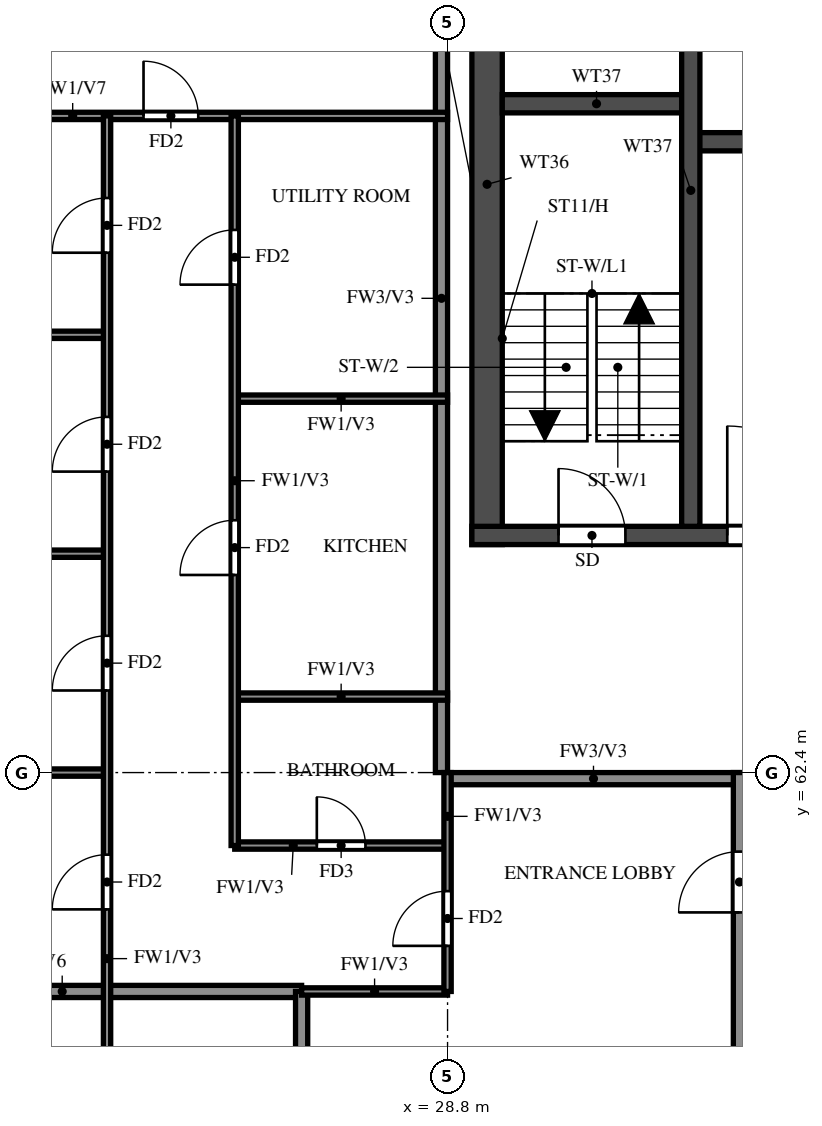
"""IFC4 building model, lengths in metres.
Left out: names, types, materials, properties, quantities, classifications, styles, units other than length and angle.
Written with IfcOpenShell. Run it as: python <this file> out.ifc"""

import sys

from ifc_helpers import new_model, si_unit, direction, frame, frame_2d, origin, place, context, subcontext, project, spatial, rectangle, extrude, element, fill, save


model = new_model("IFC4")
c1 = context("Model", 3, precision=1e-05, world=origin(), true_north=direction((0.0, 1.0)))
c2 = subcontext(c1, "Body", "Model", "MODEL_VIEW")
j1 = project(units=[si_unit("LENGTHUNIT", "METRE"), si_unit("PLANEANGLEUNIT", "RADIAN")], contexts=[c1])
p1 = place(None, origin())
s1 = spatial("IfcSite", under=j1, at=p1, CompositionType="ELEMENT")
p2 = place(p1, origin())
s2 = spatial("IfcBuilding", under=s1, at=p2, CompositionType="ELEMENT")
p3 = place(p2, frame((0.0, 0.0, 239.5)))
s3 = spatial("IfcBuildingStorey", under=s2, at=p3, CompositionType="ELEMENT", Elevation=239.5)
p4 = place(p3, frame((29.45, 66.15, 0.0), z_axis=(0.0, 0.0, 1.0), x_axis=(0.0, 1.0, 0.0)))
e1 = element("IfcWall", 1, at=p4, inside=s3, PredefinedType="SHEAR", context=c2, shape_type="SweptSolid", body=[
    extrude(rectangle(XDim=11.85, YDim=0.5, at=frame_2d((5.925, 0.0))), origin(), (0.0, 0.0, 1.0), 3.22),
])
p5 = place(p3, frame((29.2, 66.3, 0.0), z_axis=(0.0, 0.0, 1.0), x_axis=(1.0, 0.0, 0.0)))
e2 = element("IfcWall", 2, at=p5, inside=s3, PredefinedType="SHEAR", context=c2, shape_type="SweptSolid", body=[
    extrude(rectangle(XDim=42.4, YDim=0.3, at=frame_2d((21.2, 0.0))), origin(), (0.0, 0.0, 1.0), 3.22),
])
p6 = place(p5, frame((1.425, 0.0, 0.0)))
e3 = element("IfcOpeningElement", 3, at=p6, cuts=e2, PredefinedType="OPENING", context=c2, shape_type="SweptSolid", body=[
    extrude(rectangle(XDim=1.1, YDim=2.1, at=frame_2d((0.55, 1.05))), frame((0.0, 0.16, 0.0), z_axis=(0.0, -1.0, 0.0), x_axis=(1.0, 0.0, 0.0)), (0.0, 0.0, 1.0), 0.32),
])
p7 = place(p5, frame((4.2, 0.0, 0.0)))
e4 = element("IfcOpeningElement", 4, at=p7, cuts=e2, PredefinedType="OPENING", context=c2, shape_type="SweptSolid", body=[
    extrude(rectangle(XDim=1.8, YDim=2.1, at=frame_2d((0.9, 1.05))), frame((0.0, 0.16, 0.0), z_axis=(0.0, -1.0, 0.0), x_axis=(1.0, 0.0, 0.0)), (0.0, 0.0, 1.0), 0.32),
])
p8 = place(p3, frame((32.8, 72.775, 0.0), z_axis=(0.0, 0.0, 1.0), x_axis=(1.0, 0.0, 0.0)))
e5 = element("IfcWall", 5, at=p8, inside=s3, PredefinedType="SHEAR", context=c2, shape_type="SweptSolid", body=[
    extrude(rectangle(XDim=35.2, YDim=0.3, at=frame_2d((17.6, 0.0))), origin(), (0.0, 0.0, 1.0), 3.22),
])
p9 = place(p8, frame((19.8, 0.0, 0.0)))
e6 = element("IfcOpeningElement", 6, at=p9, cuts=e5, PredefinedType="OPENING", context=c2, shape_type="SweptSolid", body=[
    extrude(rectangle(XDim=1.1, YDim=2.1, at=frame_2d((0.55, 1.05))), frame((0.0, 0.16, 0.0), z_axis=(0.0, -1.0, 0.0), x_axis=(1.0, 0.0, 0.0)), (0.0, 0.0, 1.0), 0.32),
])
p10 = place(p8, frame((27.725, 0.0, 0.0)))
e7 = element("IfcOpeningElement", 7, at=p10, cuts=e5, PredefinedType="OPENING", context=c2, shape_type="SweptSolid", body=[
    extrude(rectangle(XDim=1.1, YDim=2.1, at=frame_2d((0.55, 1.05))), frame((0.0, 0.16, 0.0), z_axis=(0.0, -1.0, 0.0), x_axis=(1.0, 0.0, 0.0)), (0.0, 0.0, 1.0), 0.32),
])
p11 = place(p8, frame((30.325, 0.0, 0.0)))
e8 = element("IfcOpeningElement", 8, at=p11, cuts=e5, PredefinedType="OPENING", context=c2, shape_type="SweptSolid", body=[
    extrude(rectangle(XDim=1.1, YDim=2.1, at=frame_2d((0.55, 1.05))), frame((0.0, 0.16, 0.0), z_axis=(0.0, -1.0, 0.0), x_axis=(1.0, 0.0, 0.0)), (0.0, 0.0, 1.0), 0.32),
])
p12 = place(p8, frame((3.825, 0.0, 0.0)))
e9 = element("IfcOpeningElement", 9, at=p12, cuts=e5, PredefinedType="OPENING", context=c2, shape_type="SweptSolid", body=[
    extrude(rectangle(XDim=1.1, YDim=2.1, at=frame_2d((0.55, 1.05))), frame((0.0, 0.16, 0.0), z_axis=(0.0, -1.0, 0.0), x_axis=(1.0, 0.0, 0.0)), (0.0, 0.0, 1.0), 0.32),
])
p13 = place(p8, frame((6.575, 0.0, 0.0)))
e10 = element("IfcOpeningElement", 10, at=p13, cuts=e5, PredefinedType="OPENING", context=c2, shape_type="SweptSolid", body=[
    extrude(rectangle(XDim=1.1, YDim=2.1, at=frame_2d((0.55, 1.05))), frame((0.0, 0.16, 0.0), z_axis=(0.0, -1.0, 0.0), x_axis=(1.0, 0.0, 0.0)), (0.0, 0.0, 1.0), 0.32),
])
p14 = place(p8, frame((9.325, 0.0, 0.0)))
e11 = element("IfcOpeningElement", 11, at=p14, cuts=e5, PredefinedType="OPENING", context=c2, shape_type="SweptSolid", body=[
    extrude(rectangle(XDim=1.1, YDim=2.1, at=frame_2d((0.55, 1.05))), frame((0.0, 0.16, 0.0), z_axis=(0.0, -1.0, 0.0), x_axis=(1.0, 0.0, 0.0)), (0.0, 0.0, 1.0), 0.32),
])
p15 = place(p8, frame((12.075, 0.0, 0.0)))
e12 = element("IfcOpeningElement", 12, at=p15, cuts=e5, PredefinedType="OPENING", context=c2, shape_type="SweptSolid", body=[
    extrude(rectangle(XDim=1.1, YDim=2.1, at=frame_2d((0.55, 1.05))), frame((0.0, 0.16, 0.0), z_axis=(0.0, -1.0, 0.0), x_axis=(1.0, 0.0, 0.0)), (0.0, 0.0, 1.0), 0.32),
])
p16 = place(p8, frame((14.825, 0.0, 0.0)))
e13 = element("IfcOpeningElement", 13, at=p16, cuts=e5, PredefinedType="OPENING", context=c2, shape_type="SweptSolid", body=[
    extrude(rectangle(XDim=1.1, YDim=2.1, at=frame_2d((0.55, 1.05))), frame((0.0, 0.16, 0.0), z_axis=(0.0, -1.0, 0.0), x_axis=(1.0, 0.0, 0.0)), (0.0, 0.0, 1.0), 0.32),
])
p17 = place(p8, frame((17.575, 0.0, 0.0)))
e14 = element("IfcOpeningElement", 14, at=p17, cuts=e5, PredefinedType="OPENING", context=c2, shape_type="SweptSolid", body=[
    extrude(rectangle(XDim=1.1, YDim=2.1, at=frame_2d((0.55, 1.05))), frame((0.0, 0.16, 0.0), z_axis=(0.0, -1.0, 0.0), x_axis=(1.0, 0.0, 0.0)), (0.0, 0.0, 1.0), 0.32),
])
p18 = place(p8, frame((0.95, 0.0, 0.0)))
e15 = element("IfcOpeningElement", 15, at=p18, cuts=e5, PredefinedType="OPENING", context=c2, shape_type="SweptSolid", body=[
    extrude(rectangle(XDim=1.1, YDim=2.1, at=frame_2d((0.55, 1.05))), frame((0.0, 0.16, 0.0), z_axis=(0.0, -1.0, 0.0), x_axis=(1.0, 0.0, 0.0)), (0.0, 0.0, 1.0), 0.32),
])
p19 = place(p3, frame((29.7, 73.4, 0.0), z_axis=(0.0, 0.0, 1.0), x_axis=(1.0, 0.0, 0.0)))
e16 = element("IfcWall", 16, at=p19, inside=s3, PredefinedType="SHEAR", context=c2, shape_type="SweptSolid", body=[
    extrude(rectangle(XDim=3.1, YDim=0.3, at=frame_2d((1.55, 0.0))), origin(), (0.0, 0.0, 1.0), 3.22),
])
p20 = place(p3, frame((32.8, 66.45, 0.0), z_axis=(0.0, 0.0, 1.0), x_axis=(0.0, 1.0, 0.0)))
e17 = element("IfcWall", 17, at=p20, inside=s3, PredefinedType="SHEAR", context=c2, shape_type="SweptSolid", body=[
    extrude(rectangle(XDim=11.05, YDim=0.3, at=frame_2d((5.525, 0.0))), origin(), (0.0, 0.0, 1.0), 3.22),
])
p21 = place(p3, frame((28.8, 62.3, 0.0), z_axis=(0.0, 0.0, 1.0), x_axis=(1.0, 0.0, 0.0)))
e18 = element("IfcWall", 18, at=p21, inside=s3, PredefinedType="SOLIDWALL", context=c2, shape_type="SweptSolid", body=[
    extrude(rectangle(XDim=4.8, YDim=0.2, at=frame_2d((2.4, 0.0))), origin(), (0.0, 0.0, 1.0), 3.22),
])
p22 = place(p3, frame((28.7, 62.4, 0.0), z_axis=(0.0, 0.0, 1.0), x_axis=(0.0, 1.0, 0.0)))
e19 = element("IfcWall", 19, at=p22, inside=s3, PredefinedType="SOLIDWALL", context=c2, shape_type="SweptSolid", body=[
    extrude(rectangle(XDim=15.6, YDim=0.2, at=frame_2d((7.8, 0.0))), origin(), (0.0, 0.0, 1.0), 3.22),
])
p23 = place(p3, frame((33.6, 50.4, 0.0), z_axis=(0.0, 0.0, 1.0), x_axis=(0.0, 1.0, 0.0)))
e20 = element("IfcWall", 20, at=p23, inside=s3, PredefinedType="SOLIDWALL", context=c2, shape_type="SweptSolid", body=[
    extrude(rectangle(XDim=12.0, YDim=0.2, at=frame_2d((6.0, 0.0))), origin(), (0.0, 0.0, 1.0), 3.22),
])
p24 = place(p23, frame((0.7, 0.0, 0.0)))
e21 = element("IfcOpeningElement", 21, at=p24, cuts=e20, PredefinedType="OPENING", context=c2, shape_type="SweptSolid", body=[
    extrude(rectangle(XDim=1.0, YDim=2.1, at=frame_2d((0.5, 1.05))), frame((0.0, 0.11, 0.0), z_axis=(0.0, -1.0, 0.0), x_axis=(1.0, 0.0, 0.0)), (0.0, 0.0, 1.0), 0.22),
])
p25 = place(p23, frame((9.7, 0.0, 0.0)))
e22 = element("IfcOpeningElement", 22, at=p25, cuts=e20, PredefinedType="OPENING", context=c2, shape_type="SweptSolid", body=[
    extrude(rectangle(XDim=1.0, YDim=2.1, at=frame_2d((0.5, 1.05))), frame((0.0, 0.11, 0.0), z_axis=(0.0, -1.0, 0.0), x_axis=(1.0, 0.0, 0.0)), (0.0, 0.0, 1.0), 0.22),
])
p26 = place(p3, frame((18.525, 58.8, 0.0), z_axis=(0.0, 0.0, 1.0), x_axis=(1.0, 0.0, 0.0)))
e23 = element("IfcWall", 23, at=p26, inside=s3, PredefinedType="SOLIDWALL", context=c2, shape_type="SweptSolid", body=[
    extrude(rectangle(XDim=7.875, YDim=0.2, at=frame_2d((3.938, 0.0))), origin(), (0.0, 0.0, 1.0), 2.32),
])
p27 = place(p3, frame((26.4, 56.4, 0.0), z_axis=(0.0, 0.0, 1.0), x_axis=(0.0, 1.0, 0.0)))
e24 = element("IfcWall", 24, at=p27, inside=s3, PredefinedType="SOLIDWALL", context=c2, shape_type="SweptSolid", body=[
    extrude(rectangle(XDim=2.4, YDim=0.2, at=frame_2d((1.2, 0.0))), origin(), (0.0, 0.0, 1.0), 3.22),
])
p28 = place(p3, frame((26.4, 58.8, 0.0), z_axis=(0.0, 0.0, 1.0), x_axis=(1.0, 0.0, 0.0)))
e25 = element("IfcWall", 25, at=p28, inside=s3, PredefinedType="PARTITIONING", context=c2, shape_type="SweptSolid", body=[
    extrude(rectangle(XDim=2.4, YDim=0.12, at=frame_2d((1.2, 0.0))), origin(), (0.0, 0.0, 1.0), 3.22),
])
p29 = place(p3, frame((25.3, 61.2, 0.0), z_axis=(0.0, 0.0, 1.0), x_axis=(1.0, 0.0, 0.0)))
e26 = element("IfcWall", 26, at=p29, inside=s3, PredefinedType="PARTITIONING", context=c2, shape_type="SweptSolid", body=[
    extrude(rectangle(XDim=3.5, YDim=0.12, at=frame_2d((1.75, 0.0))), origin(), (0.0, 0.0, 1.0), 3.22),
])
p30 = place(p29, frame((1.35, 0.0, 0.0)))
e27 = element("IfcOpeningElement", 27, at=p30, cuts=e26, PredefinedType="OPENING", context=c2, shape_type="SweptSolid", body=[
    extrude(rectangle(XDim=0.8, YDim=2.1, at=frame_2d((0.4, 1.05))), frame((0.0, 0.07, 0.0), z_axis=(0.0, -1.0, 0.0), x_axis=(1.0, 0.0, 0.0)), (0.0, 0.0, 1.0), 0.14),
])
p31 = place(p3, frame((18.525, 62.4, 0.0), z_axis=(0.0, 0.0, 1.0), x_axis=(1.0, 0.0, 0.0)))
e28 = element("IfcWall", 28, at=p31, inside=s3, PredefinedType="PARTITIONING", context=c2, shape_type="SweptSolid", body=[
    extrude(rectangle(XDim=4.675, YDim=0.12, at=frame_2d((2.337, 0.0))), origin(), (0.0, 0.0, 1.0), 3.22),
])
p32 = place(p3, frame((25.3, 63.65, 0.0), z_axis=(0.0, 0.0, 1.0), x_axis=(1.0, 0.0, 0.0)))
e29 = element("IfcWall", 29, at=p32, inside=s3, PredefinedType="PARTITIONING", context=c2, shape_type="SweptSolid", body=[
    extrude(rectangle(XDim=3.5, YDim=0.12, at=frame_2d((1.75, 0.0))), origin(), (0.0, 0.0, 1.0), 3.22),
])
p33 = place(p3, frame((18.525, 66.0, 0.0), z_axis=(0.0, 0.0, 1.0), x_axis=(1.0, 0.0, 0.0)))
e30 = element("IfcWall", 30, at=p33, inside=s3, PredefinedType="PARTITIONING", context=c2, shape_type="SweptSolid", body=[
    extrude(rectangle(XDim=4.675, YDim=0.12, at=frame_2d((2.337, 0.0))), origin(), (0.0, 0.0, 1.0), 2.32),
])
p34 = place(p3, frame((25.3, 68.55, 0.0), z_axis=(0.0, 0.0, 1.0), x_axis=(1.0, 0.0, 0.0)))
e31 = element("IfcWall", 31, at=p34, inside=s3, PredefinedType="PARTITIONING", context=c2, shape_type="SweptSolid", body=[
    extrude(rectangle(XDim=3.5, YDim=0.12, at=frame_2d((1.75, 0.0))), origin(), (0.0, 0.0, 1.0), 3.22),
])
p35 = place(p3, frame((18.525, 69.6, 0.0), z_axis=(0.0, 0.0, 1.0), x_axis=(1.0, 0.0, 0.0)))
e32 = element("IfcWall", 32, at=p35, inside=s3, PredefinedType="PARTITIONING", context=c2, shape_type="SweptSolid", body=[
    extrude(rectangle(XDim=4.675, YDim=0.12, at=frame_2d((2.337, 0.0))), origin(), (0.0, 0.0, 1.0), 3.22),
])
p36 = place(p3, frame((18.525, 73.2, 0.0), z_axis=(0.0, 0.0, 1.0), x_axis=(1.0, 0.0, 0.0)))
e33 = element("IfcWall", 33, at=p36, inside=s3, PredefinedType="PARTITIONING", context=c2, shape_type="SweptSolid", body=[
    extrude(rectangle(XDim=10.275, YDim=0.12, at=frame_2d((5.138, 0.0))), origin(), (0.0, 0.0, 1.0), 2.32),
])
p37 = place(p36, frame((5.275, 0.0, 0.0)))
e34 = element("IfcOpeningElement", 34, at=p37, cuts=e33, PredefinedType="OPENING", context=c2, shape_type="SweptSolid", body=[
    extrude(rectangle(XDim=0.9, YDim=2.1, at=frame_2d((0.45, 1.05))), frame((0.0, 0.07, 0.0), z_axis=(0.0, -1.0, 0.0), x_axis=(1.0, 0.0, 0.0)), (0.0, 0.0, 1.0), 0.14),
])
p38 = place(p3, frame((23.2, 48.0, 0.0), z_axis=(0.0, 0.0, 1.0), x_axis=(0.0, 1.0, 0.0)))
e35 = element("IfcWall", 35, at=p38, inside=s3, PredefinedType="PARTITIONING", context=c2, shape_type="SweptSolid", body=[
    extrude(rectangle(XDim=25.2, YDim=0.12, at=frame_2d((12.6, 0.0))), origin(), (0.0, 0.0, 1.0), 3.22),
])
p39 = place(p38, frame((2.85, 0.0, 0.0)))
e36 = element("IfcOpeningElement", 36, at=p39, cuts=e35, PredefinedType="OPENING", context=c2, shape_type="SweptSolid", body=[
    extrude(rectangle(XDim=1.5, YDim=2.1, at=frame_2d((0.75, 1.05))), frame((0.0, 0.07, 0.0), z_axis=(0.0, -1.0, 0.0), x_axis=(1.0, 0.0, 0.0)), (0.0, 0.0, 1.0), 0.14),
])
p40 = place(p38, frame((8.55, 0.0, 0.0)))
e37 = element("IfcOpeningElement", 37, at=p40, cuts=e35, PredefinedType="OPENING", context=c2, shape_type="SweptSolid", body=[
    extrude(rectangle(XDim=0.9, YDim=2.1, at=frame_2d((0.45, 1.05))), frame((0.0, 0.07, 0.0), z_axis=(0.0, -1.0, 0.0), x_axis=(1.0, 0.0, 0.0)), (0.0, 0.0, 1.0), 0.14),
])
p41 = place(p38, frame((12.15, 0.0, 0.0)))
e38 = element("IfcOpeningElement", 38, at=p41, cuts=e35, PredefinedType="OPENING", context=c2, shape_type="SweptSolid", body=[
    extrude(rectangle(XDim=0.9, YDim=2.1, at=frame_2d((0.45, 1.05))), frame((0.0, 0.07, 0.0), z_axis=(0.0, -1.0, 0.0), x_axis=(1.0, 0.0, 0.0)), (0.0, 0.0, 1.0), 0.14),
])
p42 = place(p38, frame((15.75, 0.0, 0.0)))
e39 = element("IfcOpeningElement", 39, at=p42, cuts=e35, PredefinedType="OPENING", context=c2, shape_type="SweptSolid", body=[
    extrude(rectangle(XDim=0.9, YDim=2.1, at=frame_2d((0.45, 1.05))), frame((0.0, 0.07, 0.0), z_axis=(0.0, -1.0, 0.0), x_axis=(1.0, 0.0, 0.0)), (0.0, 0.0, 1.0), 0.14),
])
p43 = place(p38, frame((19.35, 0.0, 0.0)))
e40 = element("IfcOpeningElement", 40, at=p43, cuts=e35, PredefinedType="OPENING", context=c2, shape_type="SweptSolid", body=[
    extrude(rectangle(XDim=0.9, YDim=2.1, at=frame_2d((0.45, 1.05))), frame((0.0, 0.07, 0.0), z_axis=(0.0, -1.0, 0.0), x_axis=(1.0, 0.0, 0.0)), (0.0, 0.0, 1.0), 0.14),
])
p44 = place(p38, frame((22.95, 0.0, 0.0)))
e41 = element("IfcOpeningElement", 41, at=p44, cuts=e35, PredefinedType="OPENING", context=c2, shape_type="SweptSolid", body=[
    extrude(rectangle(XDim=0.9, YDim=2.1, at=frame_2d((0.45, 1.05))), frame((0.0, 0.07, 0.0), z_axis=(0.0, -1.0, 0.0), x_axis=(1.0, 0.0, 0.0)), (0.0, 0.0, 1.0), 0.14),
])
p45 = place(p3, frame((25.3, 61.2, 0.0), z_axis=(0.0, 0.0, 1.0), x_axis=(0.0, 1.0, 0.0)))
e42 = element("IfcWall", 42, at=p45, inside=s3, PredefinedType="PARTITIONING", context=c2, shape_type="SweptSolid", body=[
    extrude(rectangle(XDim=12.0, YDim=0.12, at=frame_2d((6.0, 0.0))), origin(), (0.0, 0.0, 1.0), 3.22),
])
p46 = place(p45, frame((4.45, 0.0, 0.0)))
e43 = element("IfcOpeningElement", 43, at=p46, cuts=e42, PredefinedType="OPENING", context=c2, shape_type="SweptSolid", body=[
    extrude(rectangle(XDim=0.9, YDim=2.1, at=frame_2d((0.45, 1.05))), frame((0.0, 0.07, 0.0), z_axis=(0.0, -1.0, 0.0), x_axis=(1.0, 0.0, 0.0)), (0.0, 0.0, 1.0), 0.14),
])
p47 = place(p45, frame((9.225, 0.0, 0.0)))
e44 = element("IfcOpeningElement", 44, at=p47, cuts=e42, PredefinedType="OPENING", context=c2, shape_type="SweptSolid", body=[
    extrude(rectangle(XDim=0.9, YDim=2.1, at=frame_2d((0.45, 1.05))), frame((0.0, 0.07, 0.0), z_axis=(0.0, -1.0, 0.0), x_axis=(1.0, 0.0, 0.0)), (0.0, 0.0, 1.0), 0.14),
])
p48 = place(p3, frame((28.8, 58.8, 0.0), z_axis=(0.0, 0.0, 1.0), x_axis=(0.0, 1.0, 0.0)))
e45 = element("IfcWall", 45, at=p48, inside=s3, PredefinedType="PARTITIONING", context=c2, shape_type="SweptSolid", body=[
    extrude(rectangle(XDim=3.6, YDim=0.12, at=frame_2d((1.8, 0.0))), origin(), (0.0, 0.0, 1.0), 3.22),
])
p49 = place(p48, frame((0.75, 0.0, 0.0)))
e46 = element("IfcOpeningElement", 46, at=p49, cuts=e45, PredefinedType="OPENING", context=c2, shape_type="SweptSolid", body=[
    extrude(rectangle(XDim=0.9, YDim=2.1, at=frame_2d((0.45, 1.05))), frame((0.0, 0.07, 0.0), z_axis=(0.0, -1.0, 0.0), x_axis=(1.0, 0.0, 0.0)), (0.0, 0.0, 1.0), 0.14),
])
p50 = place(p6, origin())
e47 = element("IfcDoor", 47, at=p50, inside=s3, OperationType="SINGLE_SWING_LEFT", PredefinedType="DOOR", context=c2, shape_type="SweptSolid", body=[
    extrude(rectangle(XDim=1.1, YDim=2.1, at=frame_2d((0.55, 1.05))), frame((0.0, 0.025, 0.0), z_axis=(0.0, -1.0, 0.0), x_axis=(1.0, 0.0, 0.0)), (0.0, 0.0, 1.0), 0.05),
])
fill(e3, e47)
p51 = place(p7, origin())
e48 = element("IfcDoor", 48, at=p51, inside=s3, OperationType="DOUBLE_DOOR_SINGLE_SWING", PredefinedType="DOOR", context=c2, shape_type="SweptSolid", body=[
    extrude(rectangle(XDim=1.8, YDim=2.1, at=frame_2d((0.9, 1.05))), frame((0.0, 0.025, 0.0), z_axis=(0.0, -1.0, 0.0), x_axis=(1.0, 0.0, 0.0)), (0.0, 0.0, 1.0), 0.05),
])
fill(e4, e48)
p52 = place(p49, origin())
e49 = element("IfcDoor", 49, at=p52, inside=s3, OperationType="SINGLE_SWING_LEFT", PredefinedType="DOOR", context=c2, shape_type="SweptSolid", body=[
    extrude(rectangle(XDim=0.9, YDim=2.1, at=frame_2d((0.45, 1.05))), frame((0.0, 0.025, 0.0), z_axis=(0.0, -1.0, 0.0), x_axis=(1.0, 0.0, 0.0)), (0.0, 0.0, 1.0), 0.05),
])
fill(e46, e49)
p53 = place(p25, origin())
e50 = element("IfcDoor", 50, at=p53, inside=s3, OperationType="SINGLE_SWING_RIGHT", PredefinedType="DOOR", context=c2, shape_type="SweptSolid", body=[
    extrude(rectangle(XDim=1.0, YDim=2.1, at=frame_2d((0.5, 1.05))), frame((0.0, 0.025, 0.0), z_axis=(0.0, -1.0, 0.0), x_axis=(1.0, 0.0, 0.0)), (0.0, 0.0, 1.0), 0.05),
])
fill(e22, e50)
p54 = place(p41, origin())
e51 = element("IfcDoor", 51, at=p54, inside=s3, OperationType="SINGLE_SWING_LEFT", PredefinedType="DOOR", context=c2, shape_type="SweptSolid", body=[
    extrude(rectangle(XDim=0.9, YDim=2.1, at=frame_2d((0.45, 1.05))), frame((0.0, 0.025, 0.0), z_axis=(0.0, -1.0, 0.0), x_axis=(1.0, 0.0, 0.0)), (0.0, 0.0, 1.0), 0.05),
])
fill(e38, e51)
p55 = place(p42, origin())
e52 = element("IfcDoor", 52, at=p55, inside=s3, OperationType="SINGLE_SWING_LEFT", PredefinedType="DOOR", context=c2, shape_type="SweptSolid", body=[
    extrude(rectangle(XDim=0.9, YDim=2.1, at=frame_2d((0.45, 1.05))), frame((0.0, 0.025, 0.0), z_axis=(0.0, -1.0, 0.0), x_axis=(1.0, 0.0, 0.0)), (0.0, 0.0, 1.0), 0.05),
])
fill(e39, e52)
p56 = place(p43, origin())
e53 = element("IfcDoor", 53, at=p56, inside=s3, OperationType="SINGLE_SWING_RIGHT", PredefinedType="DOOR", context=c2, shape_type="SweptSolid", body=[
    extrude(rectangle(XDim=0.9, YDim=2.1, at=frame_2d((0.45, 1.05))), frame((0.0, 0.025, 0.0), z_axis=(0.0, -1.0, 0.0), x_axis=(1.0, 0.0, 0.0)), (0.0, 0.0, 1.0), 0.05),
])
fill(e40, e53)
p57 = place(p44, origin())
e54 = element("IfcDoor", 54, at=p57, inside=s3, OperationType="SINGLE_SWING_LEFT", PredefinedType="DOOR", context=c2, shape_type="SweptSolid", body=[
    extrude(rectangle(XDim=0.9, YDim=2.1, at=frame_2d((0.45, 1.05))), frame((0.0, 0.025, 0.0), z_axis=(0.0, -1.0, 0.0), x_axis=(1.0, 0.0, 0.0)), (0.0, 0.0, 1.0), 0.05),
])
fill(e41, e54)
p58 = place(p37, origin())
e55 = element("IfcDoor", 55, at=p58, inside=s3, OperationType="SINGLE_SWING_LEFT", PredefinedType="DOOR", context=c2, shape_type="SweptSolid", body=[
    extrude(rectangle(XDim=0.9, YDim=2.1, at=frame_2d((0.45, 1.05))), frame((0.0, 0.025, 0.0), z_axis=(0.0, -1.0, 0.0), x_axis=(1.0, 0.0, 0.0)), (0.0, 0.0, 1.0), 0.05),
])
fill(e34, e55)
p59 = place(p30, origin())
e56 = element("IfcDoor", 56, at=p59, inside=s3, OperationType="SINGLE_SWING_RIGHT", PredefinedType="DOOR", context=c2, shape_type="SweptSolid", body=[
    extrude(rectangle(XDim=0.8, YDim=2.1, at=frame_2d((0.4, 1.05))), frame((0.0, 0.025, 0.0), z_axis=(0.0, -1.0, 0.0), x_axis=(1.0, 0.0, 0.0)), (0.0, 0.0, 1.0), 0.05),
])
fill(e27, e56)
p60 = place(p46, origin())
e57 = element("IfcDoor", 57, at=p60, inside=s3, OperationType="SINGLE_SWING_LEFT", PredefinedType="DOOR", context=c2, shape_type="SweptSolid", body=[
    extrude(rectangle(XDim=0.9, YDim=2.1, at=frame_2d((0.45, 1.05))), frame((0.0, 0.025, 0.0), z_axis=(0.0, -1.0, 0.0), x_axis=(1.0, 0.0, 0.0)), (0.0, 0.0, 1.0), 0.05),
])
fill(e43, e57)
p61 = place(p47, origin())
e58 = element("IfcDoor", 58, at=p61, inside=s3, OperationType="SINGLE_SWING_LEFT", PredefinedType="DOOR", context=c2, shape_type="SweptSolid", body=[
    extrude(rectangle(XDim=0.9, YDim=2.1, at=frame_2d((0.45, 1.05))), frame((0.0, 0.025, 0.0), z_axis=(0.0, -1.0, 0.0), x_axis=(1.0, 0.0, 0.0)), (0.0, 0.0, 1.0), 0.05),
])
fill(e44, e58)
save(model, sys.argv[1])
